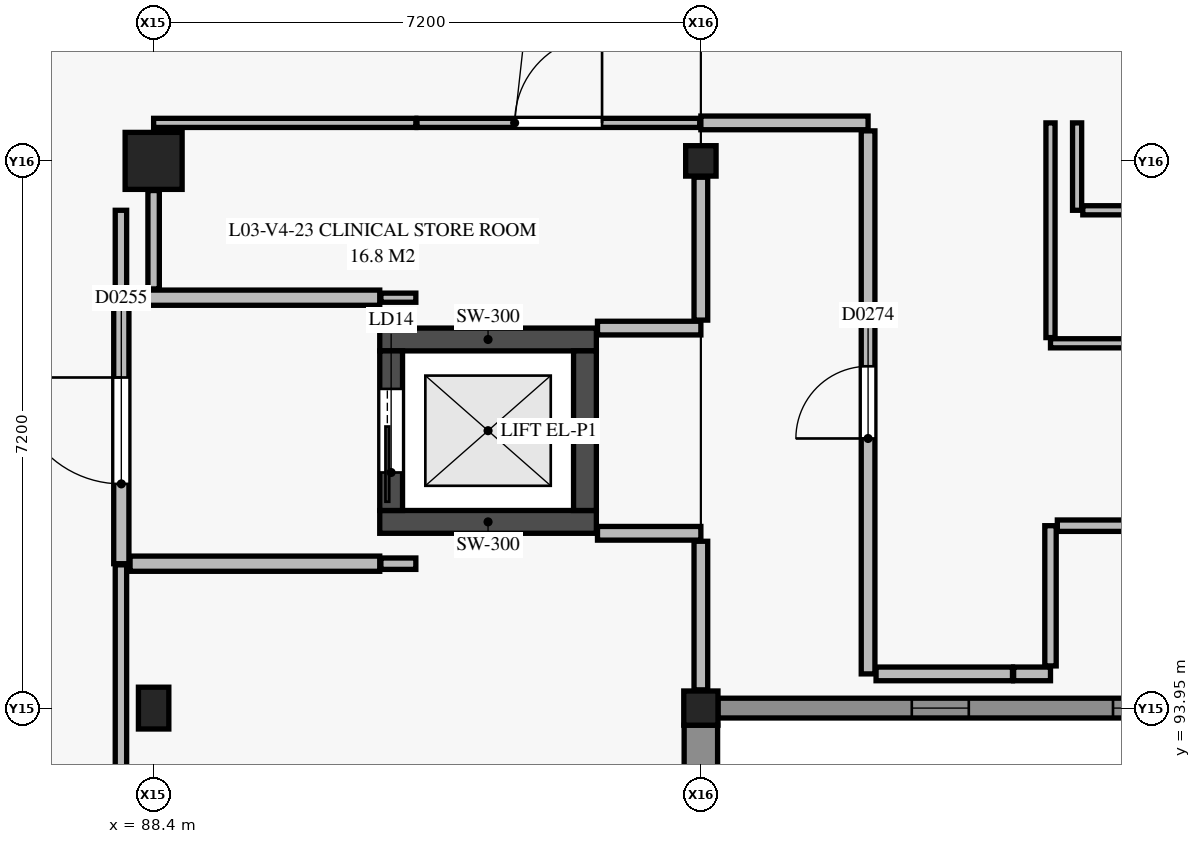
"""IFC4 building model, lengths in metres.
Left out: names, types, materials, properties, quantities, classifications, styles, units other than length and angle.
Written with IfcOpenShell. Run it as: python <this file> out.ifc"""

import sys

from ifc_helpers import new_model, si_unit, direction, frame, frame_2d, origin, origin_2d, place, context, subcontext, project, spatial, rectangle, extrude, element, fill, save


model = new_model("IFC4")
c1 = context("Model", 3, precision=1e-05, world=origin(), true_north=direction((0.0, 1.0)))
c2 = subcontext(c1, "Body", "Model", "MODEL_VIEW")
j1 = project(units=[si_unit("LENGTHUNIT", "METRE"), si_unit("PLANEANGLEUNIT", "RADIAN")], contexts=[c1])
p1 = place(None, origin())
s1 = spatial("IfcSite", under=j1, at=p1, CompositionType="ELEMENT")
p2 = place(p1, origin())
s2 = spatial("IfcBuilding", under=s1, at=p2, CompositionType="ELEMENT")
p3 = place(p2, frame((0.0, 0.0, 13.2)))
s3 = spatial("IfcBuildingStorey", under=s2, at=p3, CompositionType="ELEMENT", Elevation=13.2)
p4 = place(p3, frame((88.4, 93.95, 0.0), z_axis=(0.0, 0.0, 1.0), x_axis=(1.0, 0.0, 0.0)))
e1 = element("IfcColumn", 1, at=p4, inside=s3, PredefinedType="COLUMN", context=c2, shape_type="SweptSolid", body=[
    extrude(rectangle(XDim=0.4, YDim=0.55, at=origin_2d()), origin(), (0.0, 0.0, 1.0), 4.2),
])
p5 = place(p3, frame((88.4, 101.15, 0.0), z_axis=(0.0, 0.0, 1.0), x_axis=(1.0, 0.0, 0.0)))
e2 = element("IfcColumn", 2, at=p5, inside=s3, PredefinedType="COLUMN", context=c2, shape_type="SweptSolid", body=[
    extrude(rectangle(XDim=0.75, YDim=0.75, at=origin_2d()), origin(), (0.0, 0.0, 1.0), 4.2),
])
p6 = place(p3, frame((95.6, 93.95, 0.0), z_axis=(0.0, 0.0, 1.0), x_axis=(1.0, 0.0, 0.0)))
e3 = element("IfcColumn", 3, at=p6, inside=s3, PredefinedType="COLUMN", context=c2, shape_type="SweptSolid", body=[
    extrude(rectangle(XDim=0.45, YDim=0.45, at=origin_2d()), origin(), (0.0, 0.0, 1.0), 4.2),
])
p7 = place(p3, frame((95.6, 101.15, 0.0), z_axis=(0.0, 0.0, 1.0), x_axis=(1.0, 0.0, 0.0)))
e4 = element("IfcColumn", 4, at=p7, inside=s3, PredefinedType="COLUMN", context=c2, shape_type="SweptSolid", body=[
    extrude(rectangle(XDim=0.4, YDim=0.4, at=origin_2d()), origin(), (0.0, 0.0, 1.0), 4.2),
])
for number, where, z_axis, x_axis in (
    (5, (91.375, 96.4, 0.0), (0.0, 0.0, 1.0), (1.0, 0.0, 0.0)),
    (6, (91.375, 98.8, 0.0), (0.0, 0.0, 1.0), (1.0, 0.0, 0.0)),
):
    element("IfcWall", number, at=place(p3, frame(where, z_axis=z_axis, x_axis=x_axis)), inside=s3, PredefinedType="SHEAR", context=c2, shape_type="SweptSolid", body=[
        extrude(rectangle(XDim=2.85, YDim=0.3, at=frame_2d((1.425, 0.0))), origin(), (0.0, 0.0, 1.0), 3.95),
    ])
p8 = place(p3, frame((91.525, 96.55, 0.0), z_axis=(0.0, 0.0, 1.0), x_axis=(0.0, 1.0, 0.0)))
e7 = element("IfcWall", 7, at=p8, inside=s3, PredefinedType="SHEAR", context=c2, shape_type="SweptSolid", body=[
    extrude(rectangle(XDim=2.1, YDim=0.3, at=frame_2d((1.05, 0.0))), origin(), (0.0, 0.0, 1.0), 3.95),
])
p9 = place(p8, frame((0.5, 0.0, 0.0)))
e8 = element("IfcOpeningElement", 8, at=p9, cuts=e7, PredefinedType="OPENING", context=c2, shape_type="SweptSolid", body=[
    extrude(rectangle(XDim=1.1, YDim=2.15, at=frame_2d((0.55, 1.075))), frame((0.0, 0.16, 0.0), z_axis=(0.0, -1.0, 0.0), x_axis=(1.0, 0.0, 0.0)), (0.0, 0.0, 1.0), 0.32),
])
p10 = place(p3, frame((94.075, 96.55, 0.0), z_axis=(0.0, 0.0, 1.0), x_axis=(0.0, 1.0, 0.0)))
e9 = element("IfcWall", 9, at=p10, inside=s3, PredefinedType="SHEAR", context=c2, shape_type="SweptSolid", body=[
    extrude(rectangle(XDim=2.1, YDim=0.3, at=frame_2d((1.05, 0.0))), origin(), (0.0, 0.0, 1.0), 3.95),
])
p11 = place(p3, frame((102.425, 93.95, 0.0), z_axis=(0.0, 0.0, 1.0), x_axis=(-1.0, 0.0, 0.0)))
e10 = element("IfcWall", 10, at=p11, inside=s3, PredefinedType="SOLIDWALL", context=c2, shape_type="SweptSolid", body=[
    extrude(rectangle(XDim=6.6, YDim=0.26, at=frame_2d((3.3, 0.0))), origin(), (0.0, 0.0, 1.0), 3.13),
])
p12 = place(p11, frame((0.802, 0.0, 0.9)))
e11 = element("IfcOpeningElement", 11, at=p12, cuts=e10, PredefinedType="OPENING", context=c2, shape_type="SweptSolid", body=[
    extrude(rectangle(XDim=0.6, YDim=1.8, at=frame_2d((0.3, 0.9))), frame((0.0, 0.14, 0.0), z_axis=(0.0, -1.0, 0.0), x_axis=(1.0, 0.0, 0.0)), (0.0, 0.0, 1.0), 0.28),
])
p13 = place(p11, frame((3.3, 0.0, 0.9)))
e12 = element("IfcOpeningElement", 12, at=p13, cuts=e10, PredefinedType="OPENING", context=c2, shape_type="SweptSolid", body=[
    extrude(rectangle(XDim=0.75, YDim=1.8, at=frame_2d((0.375, 0.9))), frame((0.0, 0.14, 0.0), z_axis=(0.0, -1.0, 0.0), x_axis=(1.0, 0.0, 0.0)), (0.0, 0.0, 1.0), 0.28),
])
p14 = place(p3, frame((95.6, 93.725, 0.0), z_axis=(0.0, 0.0, 1.0), x_axis=(0.0, -1.0, 0.0)))
e13 = element("IfcWall", 13, at=p14, inside=s3, PredefinedType="USERDEFINED", context=c2, shape_type="SweptSolid", body=[
    extrude(rectangle(XDim=6.725, YDim=0.44, at=frame_2d((3.363, 0.0))), origin(), (0.0, 0.0, 1.0), 3.13),
])
p15 = place(p14, frame((1.863, 0.0, 0.6)))
e14 = element("IfcOpeningElement", 14, at=p15, cuts=e13, PredefinedType="OPENING", context=c2, shape_type="SweptSolid", body=[
    extrude(rectangle(XDim=3.0, YDim=2.2, at=frame_2d((1.5, 1.1))), frame((0.0, 0.23, 0.0), z_axis=(0.0, -1.0, 0.0), x_axis=(1.0, 0.0, 0.0)), (0.0, 0.0, 1.0), 0.46),
])
p16 = place(p3, frame((87.975, 95.85, 0.0), z_axis=(0.0, 0.0, 1.0), x_axis=(0.0, 1.0, 0.0)))
e15 = element("IfcWall", 15, at=p16, inside=s3, PredefinedType="PARTITIONING", context=c2, shape_type="SweptSolid", body=[
    extrude(rectangle(XDim=3.5, YDim=0.2, at=frame_2d((1.75, 0.0))), origin(), (0.0, 0.0, 1.0), 3.475),
])
p17 = place(p16, frame((1.05, 0.0, 0.0)))
e16 = element("IfcOpeningElement", 16, at=p17, cuts=e15, PredefinedType="OPENING", context=c2, shape_type="SweptSolid", body=[
    extrude(rectangle(XDim=1.4, YDim=2.2, at=frame_2d((0.7, 1.1))), frame((0.0, 0.11, 0.0), z_axis=(0.0, -1.0, 0.0), x_axis=(1.0, 0.0, 0.0)), (0.0, 0.0, 1.0), 0.22),
])
for number, where, z_axis, x_axis in (
    (17, (88.09, 99.35, 0.0), (0.0, 0.0, 1.0), (1.0, 0.0, 0.0)),
    (18, (88.09, 95.85, 0.0), (0.0, 0.0, 1.0), (1.0, 0.0, 0.0)),
):
    element("IfcWall", number, at=place(p3, frame(where, z_axis=z_axis, x_axis=x_axis)), inside=s3, PredefinedType="PARTITIONING", context=c2, shape_type="SweptSolid", body=[
        extrude(rectangle(XDim=3.285, YDim=0.2, at=frame_2d((1.643, 0.0))), origin(), (0.0, 0.0, 1.0), 3.415),
    ])
p18 = place(p3, frame((95.6, 101.65, 0.0), z_axis=(0.0, 0.0, 1.0), x_axis=(1.0, 0.0, 0.0)))
e19 = element("IfcWall", 19, at=p18, inside=s3, PredefinedType="PLUMBINGWALL", context=c2, shape_type="SweptSolid", body=[
    extrude(rectangle(XDim=2.2, YDim=0.18, at=frame_2d((1.1, 0.0))), origin(), (0.0, 0.0, 1.0), 3.355),
])
p19 = place(p3, frame((97.8, 94.4, 0.0), z_axis=(0.0, 0.0, 1.0), x_axis=(0.0, 1.0, 0.0)))
e20 = element("IfcWall", 20, at=p19, inside=s3, PredefinedType="PLUMBINGWALL", context=c2, shape_type="SweptSolid", body=[
    extrude(rectangle(XDim=7.145, YDim=0.18, at=frame_2d((3.573, 0.0))), origin(), (0.0, 0.0, 1.0), 3.355),
])
p20 = place(p19, frame((3.097, 0.0, 0.0)))
e21 = element("IfcOpeningElement", 21, at=p20, cuts=e20, PredefinedType="OPENING", context=c2, shape_type="SweptSolid", body=[
    extrude(rectangle(XDim=0.95, YDim=2.1, at=frame_2d((0.475, 1.05))), frame((0.0, 0.1, 0.0), z_axis=(0.0, -1.0, 0.0), x_axis=(1.0, 0.0, 0.0)), (0.0, 0.0, 1.0), 0.2),
])
p21 = place(p3, frame((97.905, 94.4, 0.0), z_axis=(0.0, 0.0, 1.0), x_axis=(1.0, 0.0, 0.0)))
e22 = element("IfcWall", 22, at=p21, inside=s3, PredefinedType="PLUMBINGWALL", context=c2, shape_type="SweptSolid", body=[
    extrude(rectangle(XDim=1.795, YDim=0.18, at=frame_2d((0.897, 0.0))), origin(), (0.0, 0.0, 1.0), 3.95),
])
p22 = place(p3, frame((99.715, 94.4, 0.0), z_axis=(0.0, 0.0, 1.0), x_axis=(1.0, 0.0, 0.0)))
e23 = element("IfcWall", 23, at=p22, inside=s3, PredefinedType="PLUMBINGWALL", context=c2, shape_type="SweptSolid", body=[
    extrude(rectangle(XDim=0.485, YDim=0.18, at=frame_2d((0.242, 0.0))), origin(), (0.0, 0.0, 1.0), 3.95),
])
p23 = place(p3, frame((100.2, 94.505, 0.0), z_axis=(0.0, 0.0, 1.0), x_axis=(0.0, 1.0, 0.0)))
e24 = element("IfcWall", 24, at=p23, inside=s3, PredefinedType="PARTITIONING", context=c2, shape_type="SweptSolid", body=[
    extrude(rectangle(XDim=1.845, YDim=0.15, at=frame_2d((0.923, 0.0))), origin(), (0.0, 0.0, 1.0), 3.515),
])
p24 = place(p3, frame((100.29, 96.35, 0.0), z_axis=(0.0, 0.0, 1.0), x_axis=(1.0, 0.0, 0.0)))
e25 = element("IfcWall", 25, at=p24, inside=s3, PredefinedType="PARTITIONING", context=c2, shape_type="SweptSolid", body=[
    extrude(rectangle(XDim=2.51, YDim=0.15, at=frame_2d((1.255, 0.0))), origin(), (0.0, 0.0, 1.0), 3.355),
])
p25 = place(p3, frame((87.97, 74.64, 0.0), z_axis=(0.0, 0.0, 1.0), x_axis=(0.0, 1.0, 0.0)))
e26 = element("IfcWall", 26, at=p25, inside=s3, PredefinedType="PARTITIONING", context=c2, shape_type="SweptSolid", body=[
    extrude(rectangle(XDim=21.195, YDim=0.15, at=frame_2d((10.598, 0.0))), origin(), (0.0, 0.0, 1.0), 3.135),
])
p26 = place(p25, frame((10.123, 0.0, 0.0)))
e27 = element("IfcOpeningElement", 27, at=p26, cuts=e26, PredefinedType="OPENING", context=c2, shape_type="SweptSolid", body=[
    extrude(rectangle(XDim=0.95, YDim=2.1, at=frame_2d((0.475, 1.05))), frame((0.0, 0.085, 0.0), z_axis=(0.0, -1.0, 0.0), x_axis=(1.0, 0.0, 0.0)), (0.0, 0.0, 1.0), 0.17),
])
p27 = place(p3, frame((87.97, 99.365, 0.0), z_axis=(0.0, 0.0, 1.0), x_axis=(0.0, 1.0, 0.0)))
e28 = element("IfcWall", 28, at=p27, inside=s3, PredefinedType="PARTITIONING", context=c2, shape_type="SweptSolid", body=[
    extrude(rectangle(XDim=1.135, YDim=0.15, at=frame_2d((0.567, 0.0))), origin(), (0.0, 0.0, 1.0), 3.95),
])
p28 = place(p3, frame((100.55, 100.5, 0.0), z_axis=(0.0, 0.0, 1.0), x_axis=(0.0, 1.0, 0.0)))
e29 = element("IfcWall", 29, at=p28, inside=s3, PredefinedType="PARTITIONING", context=c2, shape_type="SweptSolid", body=[
    extrude(rectangle(XDim=1.15, YDim=0.12, at=frame_2d((0.575, 0.0))), origin(), (0.0, 0.0, 1.0), 3.355),
])
p29 = place(p3, frame((100.625, 100.5, 0.0), z_axis=(0.0, 0.0, 1.0), x_axis=(1.0, 0.0, 0.0)))
e30 = element("IfcWall", 30, at=p29, inside=s3, PredefinedType="PARTITIONING", context=c2, shape_type="SweptSolid", body=[
    extrude(rectangle(XDim=2.175, YDim=0.12, at=frame_2d((1.087, 0.0))), origin(), (0.0, 0.0, 1.0), 3.355),
])
p30 = place(p3, frame((100.2, 98.75, 0.0), z_axis=(0.0, 0.0, 1.0), x_axis=(1.0, 0.0, 0.0)))
e31 = element("IfcWall", 31, at=p30, inside=s3, PredefinedType="PARTITIONING", context=c2, shape_type="SweptSolid", body=[
    extrude(rectangle(XDim=2.585, YDim=0.12, at=frame_2d((1.292, 0.0))), origin(), (0.0, 0.0, 1.0), 3.355),
])
p31 = place(p3, frame((100.2, 98.825, 0.0), z_axis=(0.0, 0.0, 1.0), x_axis=(0.0, 1.0, 0.0)))
e32 = element("IfcWall", 32, at=p31, inside=s3, PredefinedType="PARTITIONING", context=c2, shape_type="SweptSolid", body=[
    extrude(rectangle(XDim=2.825, YDim=0.12, at=frame_2d((1.413, 0.0))), origin(), (0.0, 0.0, 1.0), 3.355),
])
p32 = place(p3, frame((88.4, 101.65, 0.0), z_axis=(0.0, 0.0, 1.0), x_axis=(1.0, 0.0, 0.0)))
e33 = element("IfcWall", 33, at=p32, inside=s3, PredefinedType="PARTITIONING", context=c2, shape_type="SweptSolid", body=[
    extrude(rectangle(XDim=3.45, YDim=0.12, at=frame_2d((1.725, 0.0))), origin(), (0.0, 0.0, 1.0), 3.455),
])
p33 = place(p3, frame((91.865, 101.65, 0.0), z_axis=(0.0, 0.0, 1.0), x_axis=(1.0, 0.0, 0.0)))
e34 = element("IfcWall", 34, at=p33, inside=s3, PredefinedType="PARTITIONING", context=c2, shape_type="SweptSolid", body=[
    extrude(rectangle(XDim=3.72, YDim=0.12, at=frame_2d((1.86, 0.0))), origin(), (0.0, 0.0, 1.0), 3.355),
])
p34 = place(p33, frame((1.285, 0.0, 0.0)))
e35 = element("IfcOpeningElement", 35, at=p34, cuts=e34, PredefinedType="OPENING", context=c2, shape_type="SweptSolid", body=[
    extrude(rectangle(XDim=1.15, YDim=2.15, at=frame_2d((0.575, 1.075))), frame((0.0, 0.07, 0.0), z_axis=(0.0, -1.0, 0.0), x_axis=(1.0, 0.0, 0.0)), (0.0, 0.0, 1.0), 0.14),
])
p35 = place(p3, frame((94.24, 96.25, 0.0), z_axis=(0.0, 0.0, 1.0), x_axis=(1.0, 0.0, 0.0)))
e36 = element("IfcWall", 36, at=p35, inside=s3, PredefinedType="PLUMBINGWALL", context=c2, shape_type="SweptSolid", body=[
    extrude(rectangle(XDim=1.36, YDim=0.18, at=frame_2d((0.68, 0.0))), origin(), (0.0, 0.0, 1.0), 3.235),
])
p36 = place(p3, frame((95.6, 94.19, 0.0), z_axis=(0.0, 0.0, 1.0), x_axis=(0.0, 1.0, 0.0)))
e37 = element("IfcWall", 37, at=p36, inside=s3, PredefinedType="PLUMBINGWALL", context=c2, shape_type="SweptSolid", body=[
    extrude(rectangle(XDim=1.955, YDim=0.18, at=frame_2d((0.978, 0.0))), origin(), (0.0, 0.0, 1.0), 3.235),
])
p37 = place(p3, frame((94.24, 98.95, 0.0), z_axis=(0.0, 0.0, 1.0), x_axis=(1.0, 0.0, 0.0)))
e38 = element("IfcWall", 38, at=p37, inside=s3, PredefinedType="PLUMBINGWALL", context=c2, shape_type="SweptSolid", body=[
    extrude(rectangle(XDim=1.36, YDim=0.18, at=frame_2d((0.68, 0.0))), origin(), (0.0, 0.0, 1.0), 3.235),
])
p38 = place(p3, frame((95.6, 99.055, 0.0), z_axis=(0.0, 0.0, 1.0), x_axis=(0.0, 1.0, 0.0)))
e39 = element("IfcWall", 39, at=p38, inside=s3, PredefinedType="PLUMBINGWALL", context=c2, shape_type="SweptSolid", body=[
    extrude(rectangle(XDim=1.88, YDim=0.18, at=frame_2d((0.94, 0.0))), origin(), (0.0, 0.0, 1.0), 3.235),
])
p39 = place(p3, frame((88.4, 99.465, 0.0), z_axis=(0.0, 0.0, 1.0), x_axis=(0.0, 1.0, 0.0)))
e40 = element("IfcWall", 40, at=p39, inside=s3, PredefinedType="PARTITIONING", context=c2, shape_type="SweptSolid", body=[
    extrude(rectangle(XDim=1.295, YDim=0.15, at=frame_2d((0.647, 0.0))), origin(), (0.0, 0.0, 1.0), 3.415),
])
p40 = place(p3, frame((91.39, 95.85, 0.0), z_axis=(0.0, 0.0, 1.0), x_axis=(1.0, 0.0, 0.0)))
e41 = element("IfcWall", 41, at=p40, inside=s3, PredefinedType="PARTITIONING", context=c2, shape_type="SweptSolid", body=[
    extrude(rectangle(XDim=0.46, YDim=0.15, at=frame_2d((0.23, 0.0))), origin(), (0.0, 0.0, 1.0), 3.95),
])
p41 = place(p3, frame((91.39, 99.35, 0.0), z_axis=(0.0, 0.0, 1.0), x_axis=(1.0, 0.0, 0.0)))
e42 = element("IfcWall", 42, at=p41, inside=s3, PredefinedType="PARTITIONING", context=c2, shape_type="SweptSolid", body=[
    extrude(rectangle(XDim=0.46, YDim=0.12, at=frame_2d((0.23, 0.0))), origin(), (0.0, 0.0, 1.0), 3.95),
])
p42 = place(p12, origin())
e43 = element("IfcWindow", 43, at=p42, inside=s3, PartitioningType="SINGLE_PANEL", PredefinedType="WINDOW", context=c2, shape_type="SweptSolid", body=[
    extrude(rectangle(XDim=0.6, YDim=1.8, at=frame_2d((0.3, 0.9))), frame((0.0, 0.03, 0.0), z_axis=(0.0, -1.0, 0.0), x_axis=(1.0, 0.0, 0.0)), (0.0, 0.0, 1.0), 0.06),
])
fill(e11, e43)
p43 = place(p13, origin())
e44 = element("IfcWindow", 44, at=p43, inside=s3, PartitioningType="SINGLE_PANEL", PredefinedType="WINDOW", context=c2, shape_type="SweptSolid", body=[
    extrude(rectangle(XDim=0.75, YDim=1.8, at=frame_2d((0.375, 0.9))), frame((0.0, 0.03, 0.0), z_axis=(0.0, -1.0, 0.0), x_axis=(1.0, 0.0, 0.0)), (0.0, 0.0, 1.0), 0.06),
])
fill(e12, e44)
p44 = place(p9, origin())
e45 = element("IfcDoor", 45, at=p44, inside=s3, OperationType="SLIDING_TO_LEFT", PredefinedType="DOOR", context=c2, shape_type="SweptSolid", body=[
    extrude(rectangle(XDim=1.1, YDim=2.15, at=frame_2d((0.55, 1.075))), frame((0.0, 0.025, 0.0), z_axis=(0.0, -1.0, 0.0), x_axis=(1.0, 0.0, 0.0)), (0.0, 0.0, 1.0), 0.05),
])
fill(e8, e45)
p45 = place(p17, origin())
e46 = element("IfcDoor", 46, at=p45, inside=s3, OperationType="SINGLE_SWING_RIGHT", PredefinedType="DOOR", context=c2, shape_type="SweptSolid", body=[
    extrude(rectangle(XDim=1.4, YDim=2.2, at=frame_2d((0.7, 1.1))), frame((0.0, 0.025, 0.0), z_axis=(0.0, -1.0, 0.0), x_axis=(1.0, 0.0, 0.0)), (0.0, 0.0, 1.0), 0.05),
])
fill(e16, e46)
p46 = place(p20, origin())
e47 = element("IfcDoor", 47, at=p46, inside=s3, OperationType="SINGLE_SWING_LEFT", PredefinedType="DOOR", context=c2, shape_type="SweptSolid", body=[
    extrude(rectangle(XDim=0.95, YDim=2.1, at=frame_2d((0.475, 1.05))), frame((0.0, 0.025, 0.0), z_axis=(0.0, -1.0, 0.0), x_axis=(1.0, 0.0, 0.0)), (0.0, 0.0, 1.0), 0.05),
])
fill(e21, e47)
p47 = place(p34, origin())
e48 = element("IfcDoor", 48, at=p47, inside=s3, OperationType="SINGLE_SWING_RIGHT", PredefinedType="DOOR", context=c2, shape_type="SweptSolid", body=[
    extrude(rectangle(XDim=1.15, YDim=2.15, at=frame_2d((0.575, 1.075))), frame((0.0, 0.025, 0.0), z_axis=(0.0, -1.0, 0.0), x_axis=(1.0, 0.0, 0.0)), (0.0, 0.0, 1.0), 0.05),
])
fill(e35, e48)
save(model, sys.argv[1])
